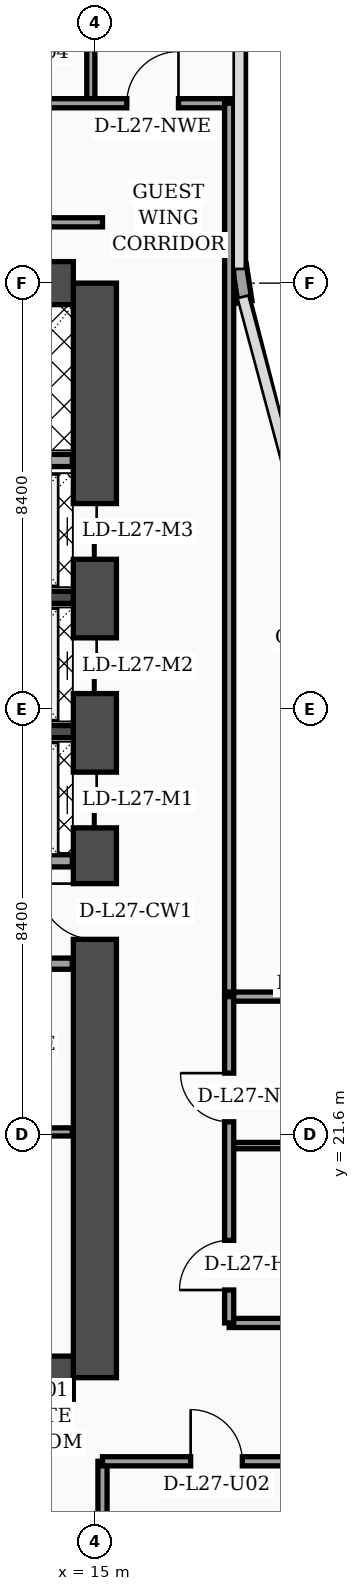
"""IFC4 building model, lengths in metres.
Left out: names, types, materials, properties, quantities, classifications, styles, units other than length and angle.
Written with IfcOpenShell. Run it as: python <this file> out.ifc"""

import sys

from ifc_helpers import new_model, si_unit, direction, frame, frame_2d, origin, place, context, subcontext, project, spatial, rectangle, extrude, element, fill, save


model = new_model("IFC4")
c1 = context("Model", 3, precision=1e-05, world=origin(), true_north=direction((0.0, 1.0)))
c2 = subcontext(c1, "Body", "Model", "MODEL_VIEW")
j1 = project(units=[si_unit("LENGTHUNIT", "METRE"), si_unit("PLANEANGLEUNIT", "RADIAN")], contexts=[c1])
p1 = place(None, origin())
s1 = spatial("IfcSite", under=j1, at=p1, CompositionType="ELEMENT")
p2 = place(p1, origin())
s2 = spatial("IfcBuilding", under=s1, at=p2, CompositionType="ELEMENT")
p3 = place(p2, frame((0.0, 0.0, 112.6)))
s3 = spatial("IfcBuildingStorey", under=s2, at=p3, CompositionType="ELEMENT", Elevation=112.6)
p4 = place(p3, frame((15.0, 16.8, 0.0), z_axis=(0.0, 0.0, 1.0), x_axis=(0.0, 1.0, 0.0)))
e1 = element("IfcWall", 1, at=p4, inside=s3, PredefinedType="SHEAR", context=c2, shape_type="SweptSolid", body=[
    extrude(rectangle(XDim=21.6, YDim=0.85, at=frame_2d((10.8, 0.0))), origin(), (0.0, 0.0, 1.0), 3.56),
])
p5 = place(p4, frame((8.65, 0.0, 0.0)))
e2 = element("IfcOpeningElement", 2, at=p5, cuts=e1, PredefinedType="OPENING", context=c2, shape_type="SweptSolid", body=[
    extrude(rectangle(XDim=1.1, YDim=2.2, at=frame_2d((0.55, 1.1))), frame((0.0, 0.435, 0.0), z_axis=(0.0, -1.0, 0.0), x_axis=(1.0, 0.0, 0.0)), (0.0, 0.0, 1.0), 0.87),
])
p6 = place(p4, frame((10.85, 0.0, 0.0)))
e3 = element("IfcOpeningElement", 3, at=p6, cuts=e1, PredefinedType="OPENING", context=c2, shape_type="SweptSolid", body=[
    extrude(rectangle(XDim=1.1, YDim=2.2, at=frame_2d((0.55, 1.1))), frame((0.0, 0.435, 0.0), z_axis=(0.0, -1.0, 0.0), x_axis=(1.0, 0.0, 0.0)), (0.0, 0.0, 1.0), 0.87),
])
p7 = place(p4, frame((13.5, 0.0, 0.0)))
e4 = element("IfcOpeningElement", 4, at=p7, cuts=e1, PredefinedType="OPENING", context=c2, shape_type="SweptSolid", body=[
    extrude(rectangle(XDim=1.1, YDim=2.2, at=frame_2d((0.55, 1.1))), frame((0.0, 0.435, 0.0), z_axis=(0.0, -1.0, 0.0), x_axis=(1.0, 0.0, 0.0)), (0.0, 0.0, 1.0), 0.87),
])
p8 = place(p4, frame((16.15, 0.0, 0.0)))
e5 = element("IfcOpeningElement", 5, at=p8, cuts=e1, PredefinedType="OPENING", context=c2, shape_type="SweptSolid", body=[
    extrude(rectangle(XDim=1.1, YDim=2.2, at=frame_2d((0.55, 1.1))), frame((0.0, 0.435, 0.0), z_axis=(0.0, -1.0, 0.0), x_axis=(1.0, 0.0, 0.0)), (0.0, 0.0, 1.0), 0.87),
])
for number, where, z_axis, x_axis in (
    (6, (4.625, 38.4, 0.0), (0.0, 0.0, 1.0), (1.0, 0.0, 0.0)),
    (7, (4.625, 16.8, 0.0), (0.0, 0.0, 1.0), (1.0, 0.0, 0.0)),
):
    element("IfcWall", number, at=place(p3, frame(where, z_axis=z_axis, x_axis=x_axis)), inside=s3, PredefinedType="SHEAR", context=c2, shape_type="SweptSolid", body=[
        extrude(rectangle(XDim=9.95, YDim=0.85, at=frame_2d((4.975, 0.0))), origin(), (0.0, 0.0, 1.0), 3.56),
    ])
for number, where, z_axis, x_axis in (
    (8, (12.18, 29.55, 0.0), (0.0, 0.0, 1.0), (1.0, 0.0, 0.0)),
    (9, (12.18, 32.2, 0.0), (0.0, 0.0, 1.0), (1.0, 0.0, 0.0)),
):
    element("IfcWall", number, at=place(p3, frame(where, z_axis=z_axis, x_axis=x_axis)), inside=s3, PredefinedType="SOLIDWALL", context=c2, shape_type="SweptSolid", body=[
        extrude(rectangle(XDim=2.395, YDim=0.24, at=frame_2d((1.198, 0.0))), origin(), (0.0, 0.0, 1.0), 3.56),
    ])
p9 = place(p3, frame((17.962, 38.03, 0.0), z_axis=(0.0, 0.0, 1.0), x_axis=(-0.15141125477, 0.988470855377, 0.0)))
e10 = element("IfcWall", 10, at=p9, inside=s3, PredefinedType="SOLIDWALL", context=c2, shape_type="SweptSolid", body=[
    extrude(rectangle(XDim=0.739, YDim=0.28, at=frame_2d((0.369, 0.0))), origin(), (0.0, 0.0, 1.0), 3.56),
])
p10 = place(p3, frame((9.68, 21.65, 0.0), z_axis=(0.0, 0.0, 1.0), x_axis=(1.0, 0.0, 0.0)))
e11 = element("IfcWall", 11, at=p10, inside=s3, PredefinedType="PARTITIONING", context=c2, shape_type="SweptSolid", body=[
    extrude(rectangle(XDim=4.875, YDim=0.16, at=frame_2d((2.438, 0.0))), origin(), (0.0, 0.0, 1.0), 3.09),
])
p11 = place(p10, frame((1.1, 0.0, 0.0)))
e12 = element("IfcOpeningElement", 12, at=p11, cuts=e11, PredefinedType="OPENING", context=c2, shape_type="SweptSolid", body=[
    extrude(rectangle(XDim=0.98, YDim=2.15, at=frame_2d((0.49, 1.075))), frame((0.0, 0.09, 0.0), z_axis=(0.0, -1.0, 0.0), x_axis=(1.0, 0.0, 0.0)), (0.0, 0.0, 1.0), 0.18),
])
p12 = place(p3, frame((9.68, 24.97, 0.0), z_axis=(0.0, 0.0, 1.0), x_axis=(1.0, 0.0, 0.0)))
e13 = element("IfcWall", 13, at=p12, inside=s3, PredefinedType="SOLIDWALL", context=c2, shape_type="SweptSolid", body=[
    extrude(rectangle(XDim=4.875, YDim=0.22, at=frame_2d((2.438, 0.0))), origin(), (0.0, 0.0, 1.0), 2.84),
])
p13 = place(p12, frame((0.9, 0.0, 0.0)))
e14 = element("IfcOpeningElement", 14, at=p13, cuts=e13, PredefinedType="OPENING", context=c2, shape_type="SweptSolid", body=[
    extrude(rectangle(XDim=0.98, YDim=2.15, at=frame_2d((0.49, 1.075))), frame((0.0, 0.12, 0.0), z_axis=(0.0, -1.0, 0.0), x_axis=(1.0, 0.0, 0.0)), (0.0, 0.0, 1.0), 0.24),
])
p14 = place(p3, frame((12.25, 27.0, 0.0), z_axis=(0.0, 0.0, 1.0), x_axis=(1.0, 0.0, 0.0)))
e15 = element("IfcWall", 15, at=p14, inside=s3, PredefinedType="SOLIDWALL", context=c2, shape_type="SweptSolid", body=[
    extrude(rectangle(XDim=2.305, YDim=0.24, at=frame_2d((1.152, 0.0))), origin(), (0.0, 0.0, 1.0), 3.56),
])
p15 = place(p3, frame((9.66, 34.9, 0.0), z_axis=(0.0, 0.0, 1.0), x_axis=(1.0, 0.0, 0.0)))
e16 = element("IfcWall", 16, at=p15, inside=s3, PredefinedType="SOLIDWALL", context=c2, shape_type="SweptSolid", body=[
    extrude(rectangle(XDim=4.895, YDim=0.24, at=frame_2d((2.448, 0.0))), origin(), (0.0, 0.0, 1.0), 3.56),
])
p16 = place(p3, frame((15.15, 2.44, 0.0), z_axis=(0.0, 0.0, 1.0), x_axis=(0.0, 1.0, 0.0)))
e17 = element("IfcWall", 17, at=p16, inside=s3, PredefinedType="PARTITIONING", context=c2, shape_type="SweptSolid", body=[
    extrude(rectangle(XDim=12.71, YDim=0.18, at=frame_2d((6.355, 0.0))), origin(), (0.0, 0.0, 1.0), 3.04),
])
p17 = place(p3, frame((15.15, 15.15, 0.0), z_axis=(0.0, 0.0, 1.0), x_axis=(1.0, 0.0, 0.0)))
e18 = element("IfcWall", 18, at=p17, inside=s3, PredefinedType="PARTITIONING", context=c2, shape_type="SweptSolid", body=[
    extrude(rectangle(XDim=6.45, YDim=0.18, at=frame_2d((3.225, 0.0))), origin(), (0.0, 0.0, 1.0), 2.49),
])
p18 = place(p17, frame((1.74, 0.0, 0.0)))
e19 = element("IfcOpeningElement", 19, at=p18, cuts=e18, PredefinedType="OPENING", context=c2, shape_type="SweptSolid", body=[
    extrude(rectangle(XDim=1.02, YDim=2.2, at=frame_2d((0.51, 1.1))), frame((0.0, 0.1, 0.0), z_axis=(0.0, -1.0, 0.0), x_axis=(1.0, 0.0, 0.0)), (0.0, 0.0, 1.0), 0.2),
])
p19 = place(p3, frame((14.92, 41.95, 0.0), z_axis=(0.0, 0.0, 1.0), x_axis=(0.0, 1.0, 0.0)))
e20 = element("IfcWall", 20, at=p19, inside=s3, PredefinedType="PARTITIONING", context=c2, shape_type="SweptSolid", body=[
    extrude(rectangle(XDim=5.85, YDim=0.16, at=frame_2d((2.925, 0.0))), origin(), (0.0, 0.0, 1.0), 3.04),
])
p20 = place(p3, frame((0.08, 41.95, 0.0), z_axis=(0.0, 0.0, 1.0), x_axis=(1.0, 0.0, 0.0)))
e21 = element("IfcWall", 21, at=p20, inside=s3, PredefinedType="PARTITIONING", context=c2, shape_type="SweptSolid", body=[
    extrude(rectangle(XDim=17.77, YDim=0.18, at=frame_2d((8.885, 0.0))), origin(), (0.0, 0.0, 1.0), 2.84),
])
p21 = place(p20, frame((0.9, 0.0, 0.0)))
e22 = element("IfcOpeningElement", 22, at=p21, cuts=e21, PredefinedType="OPENING", context=c2, shape_type="SweptSolid", body=[
    extrude(rectangle(XDim=1.02, YDim=2.2, at=frame_2d((0.51, 1.1))), frame((0.0, 0.1, 0.0), z_axis=(0.0, -1.0, 0.0), x_axis=(1.0, 0.0, 0.0)), (0.0, 0.0, 1.0), 0.2),
])
p22 = place(p20, frame((4.57, 0.0, 0.0)))
e23 = element("IfcOpeningElement", 23, at=p22, cuts=e21, PredefinedType="OPENING", context=c2, shape_type="SweptSolid", body=[
    extrude(rectangle(XDim=1.02, YDim=2.2, at=frame_2d((0.51, 1.1))), frame((0.0, 0.1, 0.0), z_axis=(0.0, -1.0, 0.0), x_axis=(1.0, 0.0, 0.0)), (0.0, 0.0, 1.0), 0.2),
])
p23 = place(p20, frame((10.46, 0.0, 0.0)))
e24 = element("IfcOpeningElement", 24, at=p23, cuts=e21, PredefinedType="OPENING", context=c2, shape_type="SweptSolid", body=[
    extrude(rectangle(XDim=1.02, YDim=2.2, at=frame_2d((0.51, 1.1))), frame((0.0, 0.1, 0.0), z_axis=(0.0, -1.0, 0.0), x_axis=(1.0, 0.0, 0.0)), (0.0, 0.0, 1.0), 0.2),
])
p24 = place(p20, frame((15.55, 0.0, 0.0)))
e25 = element("IfcOpeningElement", 25, at=p24, cuts=e21, PredefinedType="OPENING", context=c2, shape_type="SweptSolid", body=[
    extrude(rectangle(XDim=1.02, YDim=2.2, at=frame_2d((0.51, 1.1))), frame((0.0, 0.1, 0.0), z_axis=(0.0, -1.0, 0.0), x_axis=(1.0, 0.0, 0.0)), (0.0, 0.0, 1.0), 0.2),
])
p25 = place(p3, frame((17.65, 24.3, 0.0), z_axis=(0.0, 0.0, 1.0), x_axis=(0.0, 1.0, 0.0)))
e26 = element("IfcWall", 26, at=p25, inside=s3, PredefinedType="PARTITIONING", context=c2, shape_type="SweptSolid", body=[
    extrude(rectangle(XDim=17.65, YDim=0.18, at=frame_2d((8.825, 0.0))), origin(), (0.0, 0.0, 1.0), 2.84),
])
p26 = place(p3, frame((3.755, 39.6, 0.0), z_axis=(0.0, 0.0, 1.0), x_axis=(1.0, 0.0, 0.0)))
e27 = element("IfcWall", 27, at=p26, inside=s3, PredefinedType="PARTITIONING", context=c2, shape_type="SweptSolid", body=[
    extrude(rectangle(XDim=11.395, YDim=0.18, at=frame_2d((5.698, 0.0))), origin(), (0.0, 0.0, 1.0), 2.84),
])
p27 = place(p3, frame((17.65, 17.88, 0.0), z_axis=(0.0, 0.0, 1.0), x_axis=(1.0, 0.0, 0.0)))
e28 = element("IfcWall", 28, at=p27, inside=s3, PredefinedType="PARTITIONING", context=c2, shape_type="SweptSolid", body=[
    extrude(rectangle(XDim=3.9, YDim=0.18, at=frame_2d((1.95, 0.0))), origin(), (0.0, 0.0, 1.0), 3.56),
])
p28 = place(p3, frame((17.65, 21.38, 0.0), z_axis=(0.0, 0.0, 1.0), x_axis=(1.0, 0.0, 0.0)))
e29 = element("IfcWall", 29, at=p28, inside=s3, PredefinedType="PARTITIONING", context=c2, shape_type="SweptSolid", body=[
    extrude(rectangle(XDim=3.9, YDim=0.125, at=frame_2d((1.95, 0.0))), origin(), (0.0, 0.0, 1.0), 3.09),
])
p29 = place(p3, frame((17.65, 24.32, 0.0), z_axis=(0.0, 0.0, 1.0), x_axis=(1.0, 0.0, 0.0)))
e30 = element("IfcWall", 30, at=p29, inside=s3, PredefinedType="PARTITIONING", context=c2, shape_type="SweptSolid", body=[
    extrude(rectangle(XDim=3.95, YDim=0.18, at=frame_2d((1.975, 0.0))), origin(), (0.0, 0.0, 1.0), 3.56),
])
p30 = place(p3, frame((17.65, 17.88, 0.0), z_axis=(0.0, 0.0, 1.0), x_axis=(0.0, 1.0, 0.0)))
e31 = element("IfcWall", 31, at=p30, inside=s3, PredefinedType="PARTITIONING", context=c2, shape_type="SweptSolid", body=[
    extrude(rectangle(XDim=6.44, YDim=0.18, at=frame_2d((3.22, 0.0))), origin(), (0.0, 0.0, 1.0), 3.09),
])
p31 = place(p30, frame((0.65, 0.0, 0.0)))
e32 = element("IfcOpeningElement", 32, at=p31, cuts=e31, PredefinedType="OPENING", context=c2, shape_type="SweptSolid", body=[
    extrude(rectangle(XDim=0.98, YDim=2.15, at=frame_2d((0.49, 1.075))), frame((0.0, 0.1, 0.0), z_axis=(0.0, -1.0, 0.0), x_axis=(1.0, 0.0, 0.0)), (0.0, 0.0, 1.0), 0.2),
])
p32 = place(p30, frame((3.97, 0.0, 0.0)))
e33 = element("IfcOpeningElement", 33, at=p32, cuts=e31, PredefinedType="OPENING", context=c2, shape_type="SweptSolid", body=[
    extrude(rectangle(XDim=0.96, YDim=2.2, at=frame_2d((0.48, 1.1))), frame((0.0, 0.1, 0.0), z_axis=(0.0, -1.0, 0.0), x_axis=(1.0, 0.0, 0.0)), (0.0, 0.0, 1.0), 0.2),
])
p33 = place(p18, origin())
e34 = element("IfcDoor", 34, at=p33, inside=s3, OperationType="SINGLE_SWING_LEFT", PredefinedType="DOOR", context=c2, shape_type="SweptSolid", body=[
    extrude(rectangle(XDim=1.02, YDim=2.2, at=frame_2d((0.51, 1.1))), frame((0.0, 0.025, 0.0), z_axis=(0.0, -1.0, 0.0), x_axis=(1.0, 0.0, 0.0)), (0.0, 0.0, 1.0), 0.05),
])
fill(e19, e34)
p34 = place(p24, origin())
e35 = element("IfcDoor", 35, at=p34, inside=s3, OperationType="SINGLE_SWING_RIGHT", PredefinedType="DOOR", context=c2, shape_type="SweptSolid", body=[
    extrude(rectangle(XDim=1.02, YDim=2.2, at=frame_2d((0.51, 1.1))), frame((0.0, 0.025, 0.0), z_axis=(0.0, -1.0, 0.0), x_axis=(1.0, 0.0, 0.0)), (0.0, 0.0, 1.0), 0.05),
])
fill(e25, e35)
p35 = place(p31, origin())
e36 = element("IfcDoor", 36, at=p35, inside=s3, OperationType="SINGLE_SWING_LEFT", PredefinedType="DOOR", context=c2, shape_type="SweptSolid", body=[
    extrude(rectangle(XDim=0.98, YDim=2.15, at=frame_2d((0.49, 1.075))), frame((0.0, 0.025, 0.0), z_axis=(0.0, -1.0, 0.0), x_axis=(1.0, 0.0, 0.0)), (0.0, 0.0, 1.0), 0.05),
])
fill(e32, e36)
p36 = place(p32, origin())
e37 = element("IfcDoor", 37, at=p36, inside=s3, OperationType="SINGLE_SWING_RIGHT", PredefinedType="DOOR", context=c2, shape_type="SweptSolid", body=[
    extrude(rectangle(XDim=0.96, YDim=2.2, at=frame_2d((0.48, 1.1))), frame((0.0, 0.025, 0.0), z_axis=(0.0, -1.0, 0.0), x_axis=(1.0, 0.0, 0.0)), (0.0, 0.0, 1.0), 0.05),
])
fill(e33, e37)
p37 = place(p5, origin())
e38 = element("IfcDoor", 38, at=p37, inside=s3, OperationType="SINGLE_SWING_RIGHT", PredefinedType="DOOR", context=c2, shape_type="SweptSolid", body=[
    extrude(rectangle(XDim=1.1, YDim=2.2, at=frame_2d((0.55, 1.1))), frame((0.0, 0.025, 0.0), z_axis=(0.0, -1.0, 0.0), x_axis=(1.0, 0.0, 0.0)), (0.0, 0.0, 1.0), 0.05),
])
fill(e2, e38)
p38 = place(p6, origin())
e39 = element("IfcDoor", 39, at=p38, inside=s3, OperationType="DOUBLE_DOOR_SLIDING", PredefinedType="DOOR", context=c2, shape_type="SweptSolid", body=[
    extrude(rectangle(XDim=1.1, YDim=2.2, at=frame_2d((0.55, 1.1))), frame((0.0, 0.025, 0.0), z_axis=(0.0, -1.0, 0.0), x_axis=(1.0, 0.0, 0.0)), (0.0, 0.0, 1.0), 0.05),
])
fill(e3, e39)
p39 = place(p7, origin())
e40 = element("IfcDoor", 40, at=p39, inside=s3, OperationType="DOUBLE_DOOR_SLIDING", PredefinedType="DOOR", context=c2, shape_type="SweptSolid", body=[
    extrude(rectangle(XDim=1.1, YDim=2.2, at=frame_2d((0.55, 1.1))), frame((0.0, 0.025, 0.0), z_axis=(0.0, -1.0, 0.0), x_axis=(1.0, 0.0, 0.0)), (0.0, 0.0, 1.0), 0.05),
])
fill(e4, e40)
p40 = place(p8, origin())
e41 = element("IfcDoor", 41, at=p40, inside=s3, OperationType="DOUBLE_DOOR_SLIDING", PredefinedType="DOOR", context=c2, shape_type="SweptSolid", body=[
    extrude(rectangle(XDim=1.1, YDim=2.2, at=frame_2d((0.55, 1.1))), frame((0.0, 0.025, 0.0), z_axis=(0.0, -1.0, 0.0), x_axis=(1.0, 0.0, 0.0)), (0.0, 0.0, 1.0), 0.05),
])
fill(e5, e41)
save(model, sys.argv[1])
